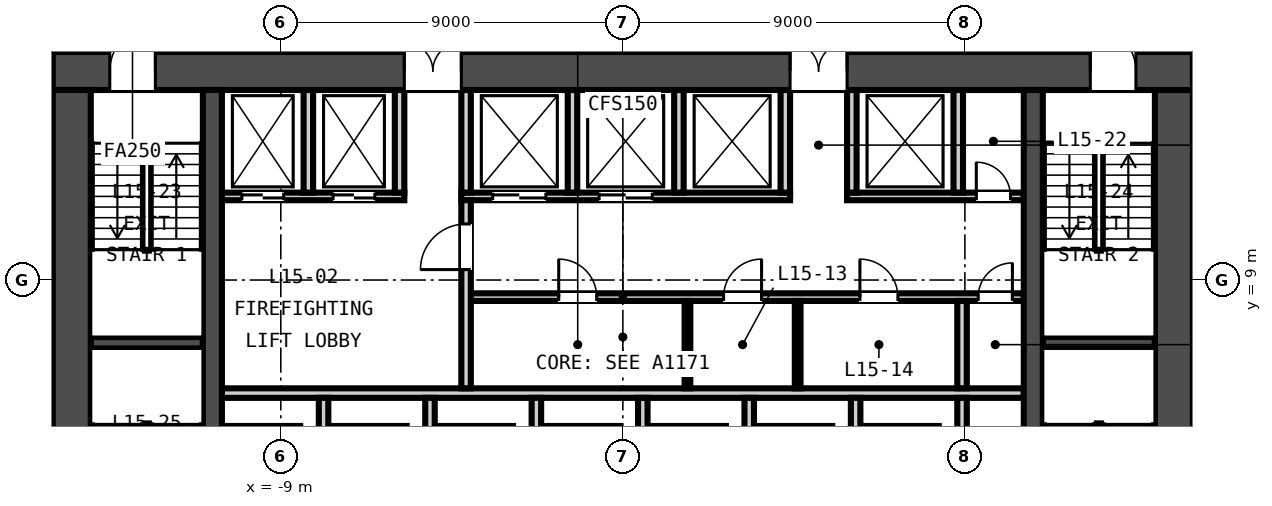
"""IFC4 building model, lengths in metres.
Left out: names, types, materials, properties, quantities, classifications, styles, units other than length and angle.
Written with IfcOpenShell. Run it as: python <this file> out.ifc"""

import sys

from ifc_helpers import new_model, si_unit, direction, frame, frame_2d, origin, place, context, subcontext, project, spatial, rectangle, extrude, element, fill, save


model = new_model("IFC4")
c1 = context("Model", 3, precision=1e-05, world=origin(), true_north=direction((0.0, 1.0)))
c2 = subcontext(c1, "Body", "Model", "MODEL_VIEW")
j1 = project(units=[si_unit("LENGTHUNIT", "METRE"), si_unit("PLANEANGLEUNIT", "RADIAN")], contexts=[c1])
p1 = place(None, origin())
s1 = spatial("IfcSite", under=j1, at=p1, CompositionType="ELEMENT")
p2 = place(p1, origin())
s2 = spatial("IfcBuilding", under=s1, at=p2, CompositionType="ELEMENT")
p3 = place(p2, frame((0.0, 0.0, 68.85)))
s3 = spatial("IfcBuildingStorey", under=s2, at=p3, CompositionType="ELEMENT", Elevation=68.85)
p4 = place(p3, frame((-15.0, 14.5, -0.15), z_axis=(0.0, 0.0, 1.0), x_axis=(1.0, 0.0, 0.0)))
e1 = element("IfcWall", 1, at=p4, inside=s3, PredefinedType="SOLIDWALL", context=c2, shape_type="SweptSolid", body=[
    extrude(rectangle(XDim=30.0, YDim=1.0, at=frame_2d((15.0, 0.0))), origin(), (0.0, 0.0, 1.0), 3.65),
])
p5 = place(p4, frame((9.25, 0.0, 0.15)))
e2 = element("IfcOpeningElement", 2, at=p5, cuts=e1, PredefinedType="OPENING", context=c2, shape_type="SweptSolid", body=[
    extrude(rectangle(XDim=1.5, YDim=2.1, at=frame_2d((0.75, 1.05))), frame((0.0, 0.51, 0.0), z_axis=(0.0, -1.0, 0.0), x_axis=(1.0, 0.0, 0.0)), (0.0, 0.0, 1.0), 1.02),
])
p6 = place(p4, frame((19.4, 0.0, 0.15)))
e3 = element("IfcOpeningElement", 3, at=p6, cuts=e1, PredefinedType="OPENING", context=c2, shape_type="SweptSolid", body=[
    extrude(rectangle(XDim=1.5, YDim=2.1, at=frame_2d((0.75, 1.05))), frame((0.0, 0.51, 0.0), z_axis=(0.0, -1.0, 0.0), x_axis=(1.0, 0.0, 0.0)), (0.0, 0.0, 1.0), 1.02),
])
p7 = place(p4, frame((1.5, 0.0, 0.15)))
e4 = element("IfcOpeningElement", 4, at=p7, cuts=e1, PredefinedType="OPENING", context=c2, shape_type="SweptSolid", body=[
    extrude(rectangle(XDim=1.2, YDim=2.1, at=frame_2d((0.6, 1.05))), frame((0.0, 0.51, 0.0), z_axis=(0.0, -1.0, 0.0), x_axis=(1.0, 0.0, 0.0)), (0.0, 0.0, 1.0), 1.02),
])
p8 = place(p4, frame((27.3, 0.0, 0.15)))
e5 = element("IfcOpeningElement", 5, at=p8, cuts=e1, PredefinedType="OPENING", context=c2, shape_type="SweptSolid", body=[
    extrude(rectangle(XDim=1.2, YDim=2.1, at=frame_2d((0.6, 1.05))), frame((0.0, 0.51, 0.0), z_axis=(0.0, -1.0, 0.0), x_axis=(1.0, 0.0, 0.0)), (0.0, 0.0, 1.0), 1.02),
])
for number, where, z_axis, x_axis in (
    (6, (-14.5, 1.0, -0.15), (0.0, 0.0, 1.0), (0.0, 1.0, 0.0)),
    (7, (14.5, 1.0, -0.15), (0.0, 0.0, 1.0), (0.0, 1.0, 0.0)),
):
    element("IfcWall", number, at=place(p3, frame(where, z_axis=z_axis, x_axis=x_axis)), inside=s3, PredefinedType="SOLIDWALL", context=c2, shape_type="SweptSolid", body=[
        extrude(rectangle(XDim=13.0, YDim=1.0, at=frame_2d((6.5, 0.0))), origin(), (0.0, 0.0, 1.0), 3.65),
    ])
for number, where, z_axis, x_axis in (
    (8, (-10.8, 1.0, -0.15), (0.0, 0.0, 1.0), (0.0, 1.0, 0.0)),
    (9, (10.8, 1.0, -0.15), (0.0, 0.0, 1.0), (0.0, 1.0, 0.0)),
):
    element("IfcWall", number, at=place(p3, frame(where, z_axis=z_axis, x_axis=x_axis)), inside=s3, PredefinedType="SOLIDWALL", context=c2, shape_type="SweptSolid", body=[
        extrude(rectangle(XDim=13.0, YDim=0.5, at=frame_2d((6.5, 0.0))), origin(), (0.0, 0.0, 1.0), 3.65),
    ])
p9 = place(p3, frame((-10.55, 6.025, 0.0), z_axis=(0.0, 0.0, 1.0), x_axis=(1.0, 0.0, 0.0)))
e10 = element("IfcWall", 10, at=p9, inside=s3, PredefinedType="PARTITIONING", context=c2, shape_type="SweptSolid", body=[
    extrude(rectangle(XDim=21.1, YDim=0.25, at=frame_2d((10.55, 0.0))), origin(), (0.0, 0.0, 1.0), 3.5),
])
p10 = place(p3, frame((-4.125, 8.55, 0.0), z_axis=(0.0, 0.0, 1.0), x_axis=(1.0, 0.0, 0.0)))
e11 = element("IfcWall", 11, at=p10, inside=s3, PredefinedType="PARTITIONING", context=c2, shape_type="SweptSolid", body=[
    extrude(rectangle(XDim=14.675, YDim=0.2, at=frame_2d((7.337, 0.0))), origin(), (0.0, 0.0, 1.0), 3.5),
])
p11 = place(p10, frame((2.438, 0.0, 0.0)))
e12 = element("IfcOpeningElement", 12, at=p11, cuts=e11, PredefinedType="OPENING", context=c2, shape_type="SweptSolid", body=[
    extrude(rectangle(XDim=1.0, YDim=2.1, at=frame_2d((0.5, 1.05))), frame((0.0, 0.11, 0.0), z_axis=(0.0, -1.0, 0.0), x_axis=(1.0, 0.0, 0.0)), (0.0, 0.0, 1.0), 0.22),
])
p12 = place(p10, frame((6.775, 0.0, 0.0)))
e13 = element("IfcOpeningElement", 13, at=p12, cuts=e11, PredefinedType="OPENING", context=c2, shape_type="SweptSolid", body=[
    extrude(rectangle(XDim=1.0, YDim=2.1, at=frame_2d((0.5, 1.05))), frame((0.0, 0.11, 0.0), z_axis=(0.0, -1.0, 0.0), x_axis=(1.0, 0.0, 0.0)), (0.0, 0.0, 1.0), 0.22),
])
p13 = place(p10, frame((10.363, 0.0, 0.0)))
e14 = element("IfcOpeningElement", 14, at=p13, cuts=e11, PredefinedType="OPENING", context=c2, shape_type="SweptSolid", body=[
    extrude(rectangle(XDim=1.0, YDim=2.1, at=frame_2d((0.5, 1.05))), frame((0.0, 0.11, 0.0), z_axis=(0.0, -1.0, 0.0), x_axis=(1.0, 0.0, 0.0)), (0.0, 0.0, 1.0), 0.22),
])
p14 = place(p10, frame((13.475, 0.0, 0.0)))
e15 = element("IfcOpeningElement", 15, at=p14, cuts=e11, PredefinedType="OPENING", context=c2, shape_type="SweptSolid", body=[
    extrude(rectangle(XDim=0.9, YDim=2.1, at=frame_2d((0.45, 1.05))), frame((0.0, 0.11, 0.0), z_axis=(0.0, -1.0, 0.0), x_axis=(1.0, 0.0, 0.0)), (0.0, 0.0, 1.0), 0.22),
])
p15 = place(p3, frame((-10.55, 11.2, 0.0), z_axis=(0.0, 0.0, 1.0), x_axis=(1.0, 0.0, 0.0)))
e16 = element("IfcWall", 16, at=p15, inside=s3, PredefinedType="PARTITIONING", context=c2, shape_type="SweptSolid", body=[
    extrude(rectangle(XDim=4.8, YDim=0.2, at=frame_2d((2.4, 0.0))), origin(), (0.0, 0.0, 1.0), 3.5),
])
p16 = place(p15, frame((0.525, 0.0, 0.0)))
e17 = element("IfcOpeningElement", 17, at=p16, cuts=e16, PredefinedType="OPENING", context=c2, shape_type="SweptSolid", body=[
    extrude(rectangle(XDim=1.1, YDim=2.1, at=frame_2d((0.55, 1.05))), frame((0.0, 0.11, 0.0), z_axis=(0.0, -1.0, 0.0), x_axis=(1.0, 0.0, 0.0)), (0.0, 0.0, 1.0), 0.22),
])
p17 = place(p15, frame((2.925, 0.0, 0.0)))
e18 = element("IfcOpeningElement", 18, at=p17, cuts=e16, PredefinedType="OPENING", context=c2, shape_type="SweptSolid", body=[
    extrude(rectangle(XDim=1.1, YDim=2.1, at=frame_2d((0.55, 1.05))), frame((0.0, 0.11, 0.0), z_axis=(0.0, -1.0, 0.0), x_axis=(1.0, 0.0, 0.0)), (0.0, 0.0, 1.0), 0.22),
])
p18 = place(p3, frame((-4.25, 11.2, 0.0), z_axis=(0.0, 0.0, 1.0), x_axis=(1.0, 0.0, 0.0)))
e19 = element("IfcWall", 19, at=p18, inside=s3, PredefinedType="PARTITIONING", context=c2, shape_type="SweptSolid", body=[
    extrude(rectangle(XDim=8.65, YDim=0.2, at=frame_2d((4.325, 0.0))), origin(), (0.0, 0.0, 1.0), 3.5),
])
p19 = place(p18, frame((0.825, 0.0, 0.0)))
e20 = element("IfcOpeningElement", 20, at=p19, cuts=e19, PredefinedType="OPENING", context=c2, shape_type="SweptSolid", body=[
    extrude(rectangle(XDim=1.4, YDim=2.1, at=frame_2d((0.7, 1.05))), frame((0.0, 0.11, 0.0), z_axis=(0.0, -1.0, 0.0), x_axis=(1.0, 0.0, 0.0)), (0.0, 0.0, 1.0), 0.22),
])
p20 = place(p18, frame((3.625, 0.0, 0.0)))
e21 = element("IfcOpeningElement", 21, at=p20, cuts=e19, PredefinedType="OPENING", context=c2, shape_type="SweptSolid", body=[
    extrude(rectangle(XDim=1.4, YDim=2.1, at=frame_2d((0.7, 1.05))), frame((0.0, 0.11, 0.0), z_axis=(0.0, -1.0, 0.0), x_axis=(1.0, 0.0, 0.0)), (0.0, 0.0, 1.0), 0.22),
])
p21 = place(p3, frame((5.9, 11.2, 0.0), z_axis=(0.0, 0.0, 1.0), x_axis=(1.0, 0.0, 0.0)))
e22 = element("IfcWall", 22, at=p21, inside=s3, PredefinedType="PARTITIONING", context=c2, shape_type="SweptSolid", body=[
    extrude(rectangle(XDim=4.65, YDim=0.2, at=frame_2d((2.325, 0.0))), origin(), (0.0, 0.0, 1.0), 3.5),
])
p22 = place(p21, frame((3.4, 0.0, 0.0)))
e23 = element("IfcOpeningElement", 23, at=p22, cuts=e22, PredefinedType="OPENING", context=c2, shape_type="SweptSolid", body=[
    extrude(rectangle(XDim=0.9, YDim=2.1, at=frame_2d((0.45, 1.05))), frame((0.0, 0.11, 0.0), z_axis=(0.0, -1.0, 0.0), x_axis=(1.0, 0.0, 0.0)), (0.0, 0.0, 1.0), 0.22),
])
p23 = place(p3, frame((-4.125, 6.15, 0.0), z_axis=(0.0, 0.0, 1.0), x_axis=(0.0, 1.0, 0.0)))
e24 = element("IfcWall", 24, at=p23, inside=s3, PredefinedType="PARTITIONING", context=c2, shape_type="SweptSolid", body=[
    extrude(rectangle(XDim=4.95, YDim=0.25, at=frame_2d((2.475, 0.0))), origin(), (0.0, 0.0, 1.0), 3.5),
])
p24 = place(p23, frame((3.125, 0.0, 0.0)))
e25 = element("IfcOpeningElement", 25, at=p24, cuts=e24, PredefinedType="OPENING", context=c2, shape_type="SweptSolid", body=[
    extrude(rectangle(XDim=1.2, YDim=2.1, at=frame_2d((0.6, 1.05))), frame((0.0, 0.135, 0.0), z_axis=(0.0, -1.0, 0.0), x_axis=(1.0, 0.0, 0.0)), (0.0, 0.0, 1.0), 0.27),
])
for number, where, z_axis, x_axis in (
    (26, (-7.875, 3.6, 0.0), (0.0, 0.0, 1.0), (0.0, 1.0, 0.0)),
    (27, (-5.075, 3.6, 0.0), (0.0, 0.0, 1.0), (0.0, 1.0, 0.0)),
    (28, (-2.275, 3.6, 0.0), (0.0, 0.0, 1.0), (0.0, 1.0, 0.0)),
    (29, (0.525, 3.6, 0.0), (0.0, 0.0, 1.0), (0.0, 1.0, 0.0)),
    (30, (3.325, 3.6, 0.0), (0.0, 0.0, 1.0), (0.0, 1.0, 0.0)),
    (31, (6.125, 3.6, 0.0), (0.0, 0.0, 1.0), (0.0, 1.0, 0.0)),
    (32, (8.925, 3.6, 0.0), (0.0, 0.0, 1.0), (0.0, 1.0, 0.0)),
):
    element("IfcWall", number, at=place(p3, frame(where, z_axis=z_axis, x_axis=x_axis)), inside=s3, PredefinedType="PARTITIONING", context=c2, shape_type="SweptSolid", body=[
        extrude(rectangle(XDim=2.3, YDim=0.25, at=frame_2d((1.15, 0.0))), origin(), (0.0, 0.0, 1.0), 3.5),
    ])
for number, where, z_axis, x_axis in (
    (33, (1.7, 6.15, 0.0), (0.0, 0.0, 1.0), (0.0, 1.0, 0.0)),
    (34, (4.6, 6.15, 0.0), (0.0, 0.0, 1.0), (0.0, 1.0, 0.0)),
):
    element("IfcWall", number, at=place(p3, frame(where, z_axis=z_axis, x_axis=x_axis)), inside=s3, PredefinedType="PARTITIONING", context=c2, shape_type="SweptSolid", body=[
        extrude(rectangle(XDim=2.3, YDim=0.15, at=frame_2d((1.15, 0.0))), origin(), (0.0, 0.0, 1.0), 3.5),
    ])
p25 = place(p3, frame((8.925, 6.15, 0.0), z_axis=(0.0, 0.0, 1.0), x_axis=(0.0, 1.0, 0.0)))
e35 = element("IfcWall", 35, at=p25, inside=s3, PredefinedType="PARTITIONING", context=c2, shape_type="SweptSolid", body=[
    extrude(rectangle(XDim=2.3, YDim=0.25, at=frame_2d((1.15, 0.0))), origin(), (0.0, 0.0, 1.0), 3.5),
])
for number, where, z_axis, x_axis in (
    (36, (-8.275, 11.3, 0.0), (0.0, 0.0, 1.0), (0.0, 1.0, 0.0)),
    (37, (-5.875, 11.3, 0.0), (0.0, 0.0, 1.0), (0.0, 1.0, 0.0)),
    (38, (-4.125, 11.3, 0.0), (0.0, 0.0, 1.0), (0.0, 1.0, 0.0)),
    (39, (-1.325, 11.3, 0.0), (0.0, 0.0, 1.0), (0.0, 1.0, 0.0)),
    (40, (1.475, 11.3, 0.0), (0.0, 0.0, 1.0), (0.0, 1.0, 0.0)),
    (41, (4.275, 11.3, 0.0), (0.0, 0.0, 1.0), (0.0, 1.0, 0.0)),
    (42, (6.025, 11.3, 0.0), (0.0, 0.0, 1.0), (0.0, 1.0, 0.0)),
    (43, (8.825, 11.3, 0.0), (0.0, 0.0, 1.0), (0.0, 1.0, 0.0)),
):
    element("IfcWall", number, at=place(p3, frame(where, z_axis=z_axis, x_axis=x_axis)), inside=s3, PredefinedType="PARTITIONING", context=c2, shape_type="SweptSolid", body=[
        extrude(rectangle(XDim=2.7, YDim=0.25, at=frame_2d((1.35, 0.0))), origin(), (0.0, 0.0, 1.0), 3.5),
    ])
for number, where, z_axis, x_axis in (
    (44, (-14.0, 7.35, -0.15), (0.0, 0.0, 1.0), (1.0, 0.0, 0.0)),
    (45, (11.05, 7.35, -0.15), (0.0, 0.0, 1.0), (1.0, 0.0, 0.0)),
):
    element("IfcWall", number, at=place(p3, frame(where, z_axis=z_axis, x_axis=x_axis)), inside=s3, PredefinedType="SOLIDWALL", context=c2, shape_type="SweptSolid", body=[
        extrude(rectangle(XDim=2.95, YDim=0.3, at=frame_2d((1.475, 0.0))), origin(), (0.0, 0.0, 1.0), 3.65),
    ])
p26 = place(p24, origin())
e46 = element("IfcDoor", 46, at=p26, inside=s3, OperationType="SINGLE_SWING_LEFT", PredefinedType="DOOR", context=c2, shape_type="SweptSolid", body=[
    extrude(rectangle(XDim=1.2, YDim=2.1, at=frame_2d((0.6, 1.05))), frame((0.0, 0.025, 0.0), z_axis=(0.0, -1.0, 0.0), x_axis=(1.0, 0.0, 0.0)), (0.0, 0.0, 1.0), 0.05),
])
fill(e25, e46)
p27 = place(p11, origin())
e47 = element("IfcDoor", 47, at=p27, inside=s3, OperationType="SINGLE_SWING_LEFT", PredefinedType="DOOR", context=c2, shape_type="SweptSolid", body=[
    extrude(rectangle(XDim=1.0, YDim=2.1, at=frame_2d((0.5, 1.05))), frame((0.0, 0.025, 0.0), z_axis=(0.0, -1.0, 0.0), x_axis=(1.0, 0.0, 0.0)), (0.0, 0.0, 1.0), 0.05),
])
fill(e12, e47)
p28 = place(p12, origin())
e48 = element("IfcDoor", 48, at=p28, inside=s3, OperationType="SINGLE_SWING_RIGHT", PredefinedType="DOOR", context=c2, shape_type="SweptSolid", body=[
    extrude(rectangle(XDim=1.0, YDim=2.1, at=frame_2d((0.5, 1.05))), frame((0.0, 0.025, 0.0), z_axis=(0.0, -1.0, 0.0), x_axis=(1.0, 0.0, 0.0)), (0.0, 0.0, 1.0), 0.05),
])
fill(e13, e48)
p29 = place(p13, origin())
e49 = element("IfcDoor", 49, at=p29, inside=s3, OperationType="SINGLE_SWING_LEFT", PredefinedType="DOOR", context=c2, shape_type="SweptSolid", body=[
    extrude(rectangle(XDim=1.0, YDim=2.1, at=frame_2d((0.5, 1.05))), frame((0.0, 0.025, 0.0), z_axis=(0.0, -1.0, 0.0), x_axis=(1.0, 0.0, 0.0)), (0.0, 0.0, 1.0), 0.05),
])
fill(e14, e49)
p30 = place(p14, origin())
e50 = element("IfcDoor", 50, at=p30, inside=s3, OperationType="SINGLE_SWING_RIGHT", PredefinedType="DOOR", context=c2, shape_type="SweptSolid", body=[
    extrude(rectangle(XDim=0.9, YDim=2.1, at=frame_2d((0.45, 1.05))), frame((0.0, 0.025, 0.0), z_axis=(0.0, -1.0, 0.0), x_axis=(1.0, 0.0, 0.0)), (0.0, 0.0, 1.0), 0.05),
])
fill(e15, e50)
p31 = place(p16, origin())
e51 = element("IfcDoor", 51, at=p31, inside=s3, OperationType="DOUBLE_DOOR_SLIDING", PredefinedType="DOOR", context=c2, shape_type="SweptSolid", body=[
    extrude(rectangle(XDim=1.1, YDim=2.1, at=frame_2d((0.55, 1.05))), frame((0.0, 0.025, 0.0), z_axis=(0.0, -1.0, 0.0), x_axis=(1.0, 0.0, 0.0)), (0.0, 0.0, 1.0), 0.05),
])
fill(e17, e51)
p32 = place(p17, origin())
e52 = element("IfcDoor", 52, at=p32, inside=s3, OperationType="DOUBLE_DOOR_SLIDING", PredefinedType="DOOR", context=c2, shape_type="SweptSolid", body=[
    extrude(rectangle(XDim=1.1, YDim=2.1, at=frame_2d((0.55, 1.05))), frame((0.0, 0.025, 0.0), z_axis=(0.0, -1.0, 0.0), x_axis=(1.0, 0.0, 0.0)), (0.0, 0.0, 1.0), 0.05),
])
fill(e18, e52)
p33 = place(p19, origin())
e53 = element("IfcDoor", 53, at=p33, inside=s3, OperationType="DOUBLE_DOOR_SLIDING", PredefinedType="DOOR", context=c2, shape_type="SweptSolid", body=[
    extrude(rectangle(XDim=1.4, YDim=2.1, at=frame_2d((0.7, 1.05))), frame((0.0, 0.025, 0.0), z_axis=(0.0, -1.0, 0.0), x_axis=(1.0, 0.0, 0.0)), (0.0, 0.0, 1.0), 0.05),
])
fill(e20, e53)
p34 = place(p20, origin())
e54 = element("IfcDoor", 54, at=p34, inside=s3, OperationType="DOUBLE_DOOR_SLIDING", PredefinedType="DOOR", context=c2, shape_type="SweptSolid", body=[
    extrude(rectangle(XDim=1.4, YDim=2.1, at=frame_2d((0.7, 1.05))), frame((0.0, 0.025, 0.0), z_axis=(0.0, -1.0, 0.0), x_axis=(1.0, 0.0, 0.0)), (0.0, 0.0, 1.0), 0.05),
])
fill(e21, e54)
p35 = place(p22, origin())
e55 = element("IfcDoor", 55, at=p35, inside=s3, OperationType="SINGLE_SWING_LEFT", PredefinedType="DOOR", context=c2, shape_type="SweptSolid", body=[
    extrude(rectangle(XDim=0.9, YDim=2.1, at=frame_2d((0.45, 1.05))), frame((0.0, 0.025, 0.0), z_axis=(0.0, -1.0, 0.0), x_axis=(1.0, 0.0, 0.0)), (0.0, 0.0, 1.0), 0.05),
])
fill(e23, e55)
p36 = place(p5, origin())
e56 = element("IfcDoor", 56, at=p36, inside=s3, OperationType="DOUBLE_DOOR_SINGLE_SWING", PredefinedType="DOOR", context=c2, shape_type="SweptSolid", body=[
    extrude(rectangle(XDim=1.5, YDim=2.1, at=frame_2d((0.75, 1.05))), frame((0.0, 0.025, 0.0), z_axis=(0.0, -1.0, 0.0), x_axis=(1.0, 0.0, 0.0)), (0.0, 0.0, 1.0), 0.05),
])
fill(e2, e56)
p37 = place(p6, origin())
e57 = element("IfcDoor", 57, at=p37, inside=s3, OperationType="DOUBLE_DOOR_SINGLE_SWING", PredefinedType="DOOR", context=c2, shape_type="SweptSolid", body=[
    extrude(rectangle(XDim=1.5, YDim=2.1, at=frame_2d((0.75, 1.05))), frame((0.0, 0.025, 0.0), z_axis=(0.0, -1.0, 0.0), x_axis=(1.0, 0.0, 0.0)), (0.0, 0.0, 1.0), 0.05),
])
fill(e3, e57)
p38 = place(p7, origin())
e58 = element("IfcDoor", 58, at=p38, inside=s3, OperationType="SINGLE_SWING_RIGHT", PredefinedType="DOOR", context=c2, shape_type="SweptSolid", body=[
    extrude(rectangle(XDim=1.2, YDim=2.1, at=frame_2d((0.6, 1.05))), frame((0.0, 0.025, 0.0), z_axis=(0.0, -1.0, 0.0), x_axis=(1.0, 0.0, 0.0)), (0.0, 0.0, 1.0), 0.05),
])
fill(e4, e58)
p39 = place(p8, origin())
e59 = element("IfcDoor", 59, at=p39, inside=s3, OperationType="SINGLE_SWING_LEFT", PredefinedType="DOOR", context=c2, shape_type="SweptSolid", body=[
    extrude(rectangle(XDim=1.2, YDim=2.1, at=frame_2d((0.6, 1.05))), frame((0.0, 0.025, 0.0), z_axis=(0.0, -1.0, 0.0), x_axis=(1.0, 0.0, 0.0)), (0.0, 0.0, 1.0), 0.05),
])
fill(e5, e59)
save(model, sys.argv[1])
